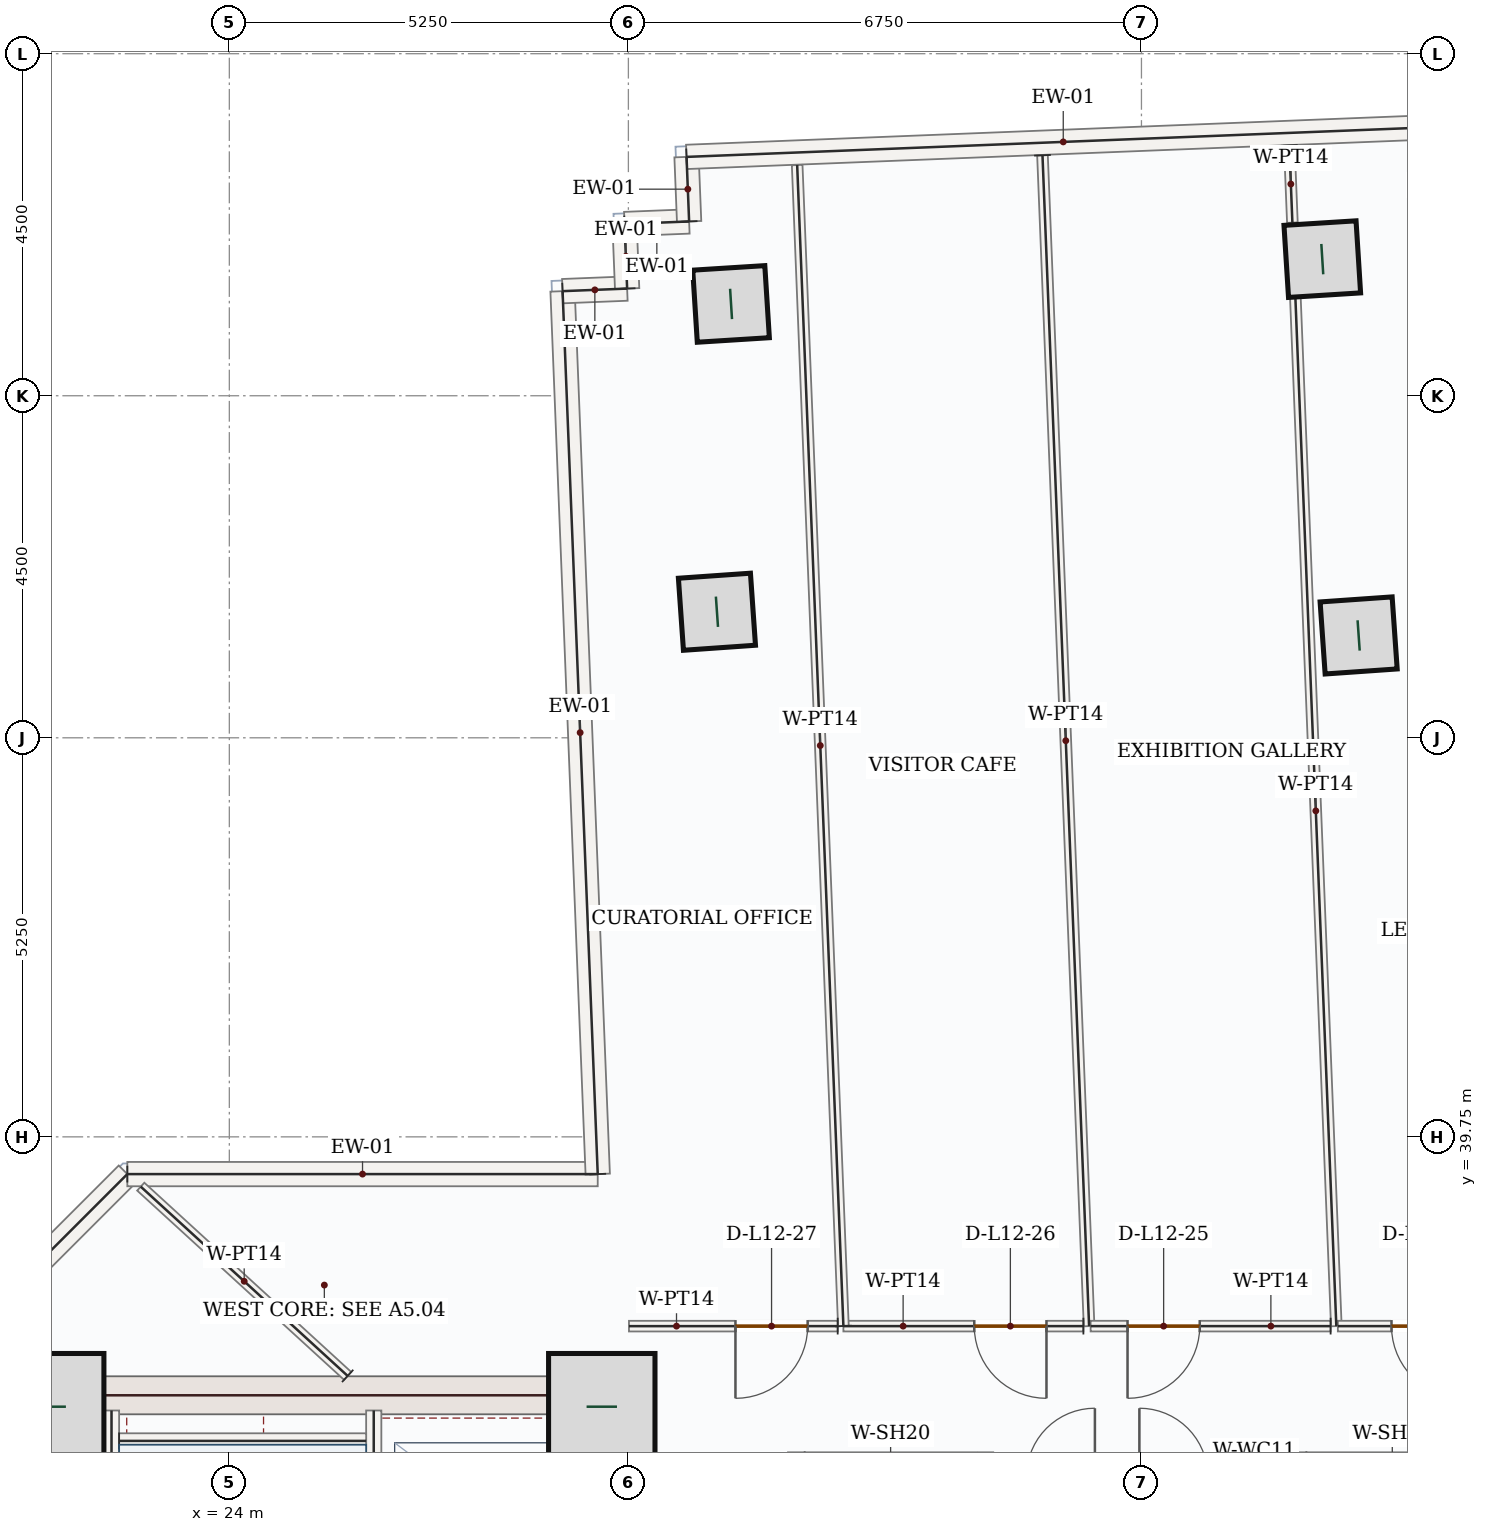
"""IFC4 building model, lengths in metres.
Left out: names, types, materials, properties, quantities, classifications, styles, units other than length and angle.
Written with IfcOpenShell. Run it as: python <this file> out.ifc"""

import sys

from ifc_helpers import new_model, si_unit, direction, frame, frame_2d, origin, origin_2d, place, context, subcontext, project, spatial, rectangle, hollow_rectangle, extrude, source, transform, mapped, element, fill, save


model = new_model("IFC4")
c1 = context("Model", 3, precision=1e-05, world=origin(), true_north=direction((0.0, 1.0)))
c2 = subcontext(c1, "Body", "Model", "MODEL_VIEW")
j1 = project(units=[si_unit("LENGTHUNIT", "METRE"), si_unit("PLANEANGLEUNIT", "RADIAN")], contexts=[c1])
p1 = place(None, origin())
s1 = spatial("IfcSite", under=j1, at=p1, CompositionType="ELEMENT")
p2 = place(p1, origin())
s2 = spatial("IfcBuilding", under=s1, at=p2, CompositionType="ELEMENT")
p3 = place(p2, frame((0.0, 0.0, 58.5)))
s3 = spatial("IfcBuildingStorey", under=s2, at=p3, CompositionType="ELEMENT", Elevation=58.5)
m1 = source(origin(), c2, "Body", "SweptSolid", [
    extrude(rectangle(XDim=8.55, YDim=0.5, at=frame_2d((4.275, 0.0))), origin(), (0.0, 0.0, 1.0), 3.95),
])
p4 = place(p3, frame((21.5, 28.05, 0.0), z_axis=(0.0, 0.0, 1.0), x_axis=(0.0, 1.0, 0.0)))
e1 = element("IfcWall", 1, at=p4, inside=s3, PredefinedType="SHEAR", context=c2, shape_type="MappedRepresentation", body=[
    mapped(m1, transform((0.0, 0.0, 0.0), x_axis=(1.0, 0.0, 0.0), y_axis=(0.0, 1.0, 0.0), z_axis=(0.0, 0.0, 1.0), scale=1.0)),
])
p5 = place(p3, frame((29.0, 28.05, 0.0), z_axis=(0.0, 0.0, 1.0), x_axis=(0.0, 1.0, 0.0)))
e2 = element("IfcWall", 2, at=p5, inside=s3, PredefinedType="SHEAR", context=c2, shape_type="SweptSolid", body=[
    extrude(rectangle(XDim=8.55, YDim=0.5, at=frame_2d((4.275, 0.0))), origin(), (0.0, 0.0, 1.0), 3.95),
])
p6 = place(p5, frame((1.5, 0.0, 0.0)))
e3 = element("IfcOpeningElement", 3, at=p6, cuts=e2, PredefinedType="OPENING", context=c2, shape_type="SweptSolid", body=[
    extrude(rectangle(XDim=1.1, YDim=2.2, at=frame_2d((0.55, 1.1))), frame((0.0, 0.26, 0.0), z_axis=(0.0, -1.0, 0.0), x_axis=(1.0, 0.0, 0.0)), (0.0, 0.0, 1.0), 0.52),
])
m2 = source(origin(), c2, "Body", "SweptSolid", [
    extrude(rectangle(XDim=7.0, YDim=0.5, at=frame_2d((3.5, 0.0))), origin(), (0.0, 0.0, 1.0), 3.95),
])
p7 = place(p3, frame((21.75, 36.35, 0.0), z_axis=(0.0, 0.0, 1.0), x_axis=(1.0, 0.0, 0.0)))
e4 = element("IfcWall", 4, at=p7, inside=s3, PredefinedType="SHEAR", context=c2, shape_type="MappedRepresentation", body=[
    mapped(m2, transform((0.0, 0.0, 0.0), x_axis=(1.0, 0.0, 0.0), y_axis=(0.0, 1.0, 0.0), z_axis=(0.0, 0.0, 1.0), scale=1.0)),
])
m3 = source(origin(), c2, "Body", "SweptSolid", [
    extrude(rectangle(XDim=1.4, YDim=1.4, at=origin_2d()), origin(), (0.0, 0.0, 1.0), 4.2),
])
for number, where, z_axis, x_axis in (
    (5, (21.65, 36.2, 0.0), (0.0, 0.0, 1.0), (1.0, 0.0, 0.0)),
    (6, (28.9, 36.2, 0.0), (0.0, 0.0, 1.0), (1.0, 0.0, 0.0)),
):
    element("IfcColumn", number, at=place(p3, frame(where, z_axis=z_axis, x_axis=x_axis)), inside=s3, PredefinedType="COLUMN", context=c2, shape_type="MappedRepresentation", body=[
        mapped(m3, transform((0.0, 0.0, 0.0), x_axis=(1.0, 0.0, 0.0), y_axis=(0.0, 1.0, 0.0), z_axis=(0.0, 0.0, 1.0), scale=1.0)),
    ])
m4 = source(origin(), c2, "Body", "SweptSolid", [
    extrude(hollow_rectangle(XDim=0.95, YDim=0.95, WallThickness=0.05, at=origin_2d()), origin(), (0.0, 0.0, 1.0), 4.2),
])
for number, where, z_axis, x_axis in (
    (7, (38.857, 46.346, 0.0), (0.0, 0.0, 1.0), (-0.07, 0.998, 0.0)),
    (8, (30.415, 46.658, 0.0), (0.0, 0.0, 1.0), (-0.07, 0.998, 0.0)),
    (9, (38.379, 51.297, 0.0), (0.0, 0.0, 1.0), (-0.063, 0.998, 0.0)),
    (10, (30.601, 50.708, 0.0), (0.0, 0.0, 1.0), (-0.063, 0.998, 0.0)),
):
    element("IfcColumn", number, at=place(p3, frame(where, z_axis=z_axis, x_axis=x_axis)), inside=s3, PredefinedType="COLUMN", context=c2, shape_type="MappedRepresentation", body=[
        mapped(m4, transform((0.0, 0.0, 0.0), x_axis=(1.0, 0.0, 0.0), y_axis=(0.0, 1.0, 0.0), z_axis=(0.0, 0.0, 1.0), scale=1.0)),
    ])
m5 = source(origin(), c2, "Body", "SweptSolid", [
    extrude(rectangle(XDim=5.258, YDim=0.32, at=frame_2d((2.629, 0.0))), origin(), (0.0, 0.0, 1.0), 3.95),
])
p8 = place(p3, frame((18.94, 35.542, 0.0), z_axis=(0.0, 0.0, 1.0), x_axis=(0.707106781187, 0.707106781187, 0.0)))
e11 = element("IfcWall", 11, at=p8, inside=s3, PredefinedType="SOLIDWALL", context=c2, shape_type="MappedRepresentation", body=[
    mapped(m5, transform((0.0, 0.0, 0.0), x_axis=(1.0, 0.0, 0.0), y_axis=(0.0, 1.0, 0.0), z_axis=(0.0, 0.0, 1.0), scale=1.0)),
])
m6 = source(origin(), c2, "Body", "SweptSolid", [
    extrude(rectangle(XDim=6.189, YDim=0.32, at=frame_2d((3.094, 0.0))), origin(), (0.0, 0.0, 1.0), 3.95),
])
p9 = place(p3, frame((22.658, 39.26, 0.0), z_axis=(0.0, 0.0, 1.0), x_axis=(1.0, 0.0, 0.0)))
e12 = element("IfcWall", 12, at=p9, inside=s3, PredefinedType="SOLIDWALL", context=c2, shape_type="MappedRepresentation", body=[
    mapped(m6, transform((0.0, 0.0, 0.0), x_axis=(1.0, 0.0, 0.0), y_axis=(0.0, 1.0, 0.0), z_axis=(0.0, 0.0, 1.0), scale=1.0)),
])
m7 = source(origin(), c2, "Body", "SweptSolid", [
    extrude(rectangle(XDim=11.625, YDim=0.32, at=frame_2d((5.812, 0.0))), origin(), (0.0, 0.0, 1.0), 3.95),
])
p10 = place(p3, frame((28.847, 39.26, 0.0), z_axis=(0.0, 0.0, 1.0), x_axis=(-0.039775975357, 0.999208622753, 0.0)))
e13 = element("IfcWall", 13, at=p10, inside=s3, PredefinedType="SOLIDWALL", context=c2, shape_type="MappedRepresentation", body=[
    mapped(m7, transform((0.0, 0.0, 0.0), x_axis=(1.0, 0.0, 0.0), y_axis=(0.0, 1.0, 0.0), z_axis=(0.0, 0.0, 1.0), scale=1.0)),
])
m8 = source(origin(), c2, "Body", "SweptSolid", [
    extrude(rectangle(XDim=0.85, YDim=0.32, at=frame_2d((0.425, 0.0))), origin(), (0.0, 0.0, 1.0), 3.95),
])
for number, where, z_axis, x_axis in (
    (14, (28.384, 50.876, 0.0), (0.0, 0.0, 1.0), (0.999, 0.04, 0.0)),
    (15, (29.233, 50.91, 0.0), (0.0, 0.0, 1.0), (-0.04, 0.999, 0.0)),
):
    element("IfcWall", number, at=place(p3, frame(where, z_axis=z_axis, x_axis=x_axis)), inside=s3, PredefinedType="SOLIDWALL", context=c2, shape_type="MappedRepresentation", body=[
        mapped(m8, transform((0.0, 0.0, 0.0), x_axis=(1.0, 0.0, 0.0), y_axis=(0.0, 1.0, 0.0), z_axis=(0.0, 0.0, 1.0), scale=1.0)),
    ])
m9 = source(origin(), c2, "Body", "SweptSolid", [
    extrude(rectangle(XDim=0.85, YDim=0.32, at=frame_2d((0.425, 0.0))), origin(), (0.0, 0.0, 1.0), 3.95),
])
p11 = place(p3, frame((29.2, 51.759, 0.0), z_axis=(0.0, 0.0, 1.0), x_axis=(0.999202792875, 0.039922158152, 0.0)))
e16 = element("IfcWall", 16, at=p11, inside=s3, PredefinedType="SOLIDWALL", context=c2, shape_type="MappedRepresentation", body=[
    mapped(m9, transform((0.0, 0.0, 0.0), x_axis=(1.0, 0.0, 0.0), y_axis=(0.0, 1.0, 0.0), z_axis=(0.0, 0.0, 1.0), scale=1.0)),
])
p12 = place(p3, frame((30.049, 51.793, 0.0), z_axis=(0.0, 0.0, 1.0), x_axis=(-0.039933618331, 0.999202334929, 0.0)))
e17 = element("IfcWall", 17, at=p12, inside=s3, PredefinedType="SOLIDWALL", context=c2, shape_type="MappedRepresentation", body=[
    mapped(m8, transform((0.0, 0.0, 0.0), x_axis=(1.0, 0.0, 0.0), y_axis=(0.0, 1.0, 0.0), z_axis=(0.0, 0.0, 1.0), scale=1.0)),
])
m10 = source(origin(), c2, "Body", "SweptSolid", [
    extrude(rectangle(XDim=9.92, YDim=0.32, at=frame_2d((4.96, 0.0))), origin(), (0.0, 0.0, 1.0), 3.95),
])
p13 = place(p3, frame((30.015, 52.642, 0.0), z_axis=(0.0, 0.0, 1.0), x_axis=(0.999207823998, 0.039796035749, 0.0)))
e18 = element("IfcWall", 18, at=p13, inside=s3, PredefinedType="SOLIDWALL", context=c2, shape_type="MappedRepresentation", body=[
    mapped(m10, transform((0.0, 0.0, 0.0), x_axis=(1.0, 0.0, 0.0), y_axis=(0.0, 1.0, 0.0), z_axis=(0.0, 0.0, 1.0), scale=1.0)),
])
m11 = source(origin(), c2, "Body", "SweptSolid", [
    extrude(rectangle(XDim=7.87, YDim=0.2, at=frame_2d((3.935, 0.0))), origin(), (0.0, 0.0, 1.0), 3.95),
])
p14 = place(p3, frame((22.45, 28.28, 0.0), z_axis=(0.0, 0.0, 1.0), x_axis=(0.0, 1.0, 0.0)))
e19 = element("IfcWall", 19, at=p14, inside=s3, PredefinedType="SOLIDWALL", context=c2, shape_type="MappedRepresentation", body=[
    mapped(m11, transform((0.0, 0.0, 0.0), x_axis=(1.0, 0.0, 0.0), y_axis=(0.0, 1.0, 0.0), z_axis=(0.0, 0.0, 1.0), scale=1.0)),
])
p15 = place(p3, frame((25.9, 28.15, 0.0), z_axis=(0.0, 0.0, 1.0), x_axis=(0.0, 1.0, 0.0)))
e20 = element("IfcWall", 20, at=p15, inside=s3, PredefinedType="SOLIDWALL", context=c2, shape_type="SweptSolid", body=[
    extrude(rectangle(XDim=8.0, YDim=0.2, at=frame_2d((4.0, 0.0))), origin(), (0.0, 0.0, 1.0), 3.95),
])
p16 = place(p15, frame((0.4, 0.0, 0.0)))
e21 = element("IfcOpeningElement", 21, at=p16, cuts=e20, PredefinedType="OPENING", context=c2, shape_type="SweptSolid", body=[
    extrude(rectangle(XDim=1.05, YDim=2.15, at=frame_2d((0.525, 1.075))), frame((0.0, 0.11, 0.0), z_axis=(0.0, -1.0, 0.0), x_axis=(1.0, 0.0, 0.0)), (0.0, 0.0, 1.0), 0.22),
])
m12 = source(origin(), c2, "Body", "SweptSolid", [
    extrude(rectangle(XDim=3.25, YDim=0.2, at=frame_2d((1.625, 0.0))), origin(), (0.0, 0.0, 1.0), 3.95),
])
p17 = place(p3, frame((22.55, 35.75, 0.0), z_axis=(0.0, 0.0, 1.0), x_axis=(1.0, 0.0, 0.0)))
e22 = element("IfcWall", 22, at=p17, inside=s3, PredefinedType="SOLIDWALL", context=c2, shape_type="MappedRepresentation", body=[
    mapped(m12, transform((0.0, 0.0, 0.0), x_axis=(1.0, 0.0, 0.0), y_axis=(0.0, 1.0, 0.0), z_axis=(0.0, 0.0, 1.0), scale=1.0)),
])
m13 = source(origin(), c2, "Body", "SweptSolid", [
    extrude(rectangle(XDim=2.4, YDim=0.2, at=frame_2d((1.2, 0.0))), origin(), (0.0, 0.0, 1.0), 3.95),
])
for number, where, z_axis, x_axis in (
    (23, (31.45, 33.2, 0.0), (0.0, 0.0, 1.0), (0.0, 1.0, 0.0)),
    (24, (33.95, 33.2, 0.0), (0.0, 0.0, 1.0), (0.0, 1.0, 0.0)),
    (25, (38.05, 33.2, 0.0), (0.0, 0.0, 1.0), (0.0, 1.0, 0.0)),
):
    element("IfcWall", number, at=place(p3, frame(where, z_axis=z_axis, x_axis=x_axis)), inside=s3, PredefinedType="SOLIDWALL", context=c2, shape_type="MappedRepresentation", body=[
        mapped(m13, transform((0.0, 0.0, 0.0), x_axis=(1.0, 0.0, 0.0), y_axis=(0.0, 1.0, 0.0), z_axis=(0.0, 0.0, 1.0), scale=1.0)),
    ])
m14 = source(origin(), c2, "Body", "SweptSolid", [
    extrude(rectangle(XDim=15.416, YDim=0.14, at=frame_2d((7.708, 0.0))), origin(), (0.0, 0.0, 1.0), 3.95),
])
p18 = place(p3, frame((34.698, 52.664, 0.0), z_axis=(0.0, 0.0, 1.0), x_axis=(0.039782723686, -0.999208354096, 0.0)))
e26 = element("IfcWall", 26, at=p18, inside=s3, PredefinedType="PARTITIONING", context=c2, shape_type="MappedRepresentation", body=[
    mapped(m14, transform((0.0, 0.0, 0.0), x_axis=(1.0, 0.0, 0.0), y_axis=(0.0, 1.0, 0.0), z_axis=(0.0, 0.0, 1.0), scale=1.0)),
])
p19 = place(p3, frame((35.236, 37.26, 0.0), z_axis=(0.0, 0.0, 1.0), x_axis=(-1.0, 0.0, 0.0)))
e27 = element("IfcWall", 27, at=p19, inside=s3, PredefinedType="PARTITIONING", context=c2, shape_type="SweptSolid", body=[
    extrude(rectangle(XDim=3.157, YDim=0.14, at=frame_2d((1.579, 0.0))), origin(), (0.0, 0.0, 1.0), 3.95),
])
p20 = place(p19, frame((0.486, 0.0, 0.0)))
e28 = element("IfcOpeningElement", 28, at=p20, cuts=e27, PredefinedType="OPENING", context=c2, shape_type="SweptSolid", body=[
    extrude(rectangle(XDim=0.95, YDim=2.15, at=frame_2d((0.475, 1.075))), frame((0.0, 0.08, 0.0), z_axis=(0.0, -1.0, 0.0), x_axis=(1.0, 0.0, 0.0)), (0.0, 0.0, 1.0), 0.16),
])
m15 = source(origin(), c2, "Body", "SweptSolid", [
    extrude(rectangle(XDim=15.286, YDim=0.14, at=frame_2d((7.643, 0.0))), origin(), (0.0, 0.0, 1.0), 3.95),
])
p21 = place(p3, frame((32.079, 37.261, 0.0), z_axis=(0.0, 0.0, 1.0), x_axis=(-0.039769031662, 0.99920889914, 0.0)))
e29 = element("IfcWall", 29, at=p21, inside=s3, PredefinedType="PARTITIONING", context=c2, shape_type="MappedRepresentation", body=[
    mapped(m15, transform((0.0, 0.0, 0.0), x_axis=(1.0, 0.0, 0.0), y_axis=(0.0, 1.0, 0.0), z_axis=(0.0, 0.0, 1.0), scale=1.0)),
])
m16 = source(origin(), c2, "Body", "SweptSolid", [
    extrude(rectangle(XDim=1.016, YDim=0.14, at=frame_2d((0.508, 0.0))), origin(), (0.0, 0.0, 1.0), 3.95),
])
p22 = place(p3, frame((37.945, 52.793, 0.0), z_axis=(0.0, 0.0, 1.0), x_axis=(0.03988168596, -0.99920440908, 0.0)))
e30 = element("IfcWall", 30, at=p22, inside=s3, PredefinedType="PARTITIONING", context=c2, shape_type="MappedRepresentation", body=[
    mapped(m16, transform((0.0, 0.0, 0.0), x_axis=(1.0, 0.0, 0.0), y_axis=(0.0, 1.0, 0.0), z_axis=(0.0, 0.0, 1.0), scale=1.0)),
])
m17 = source(origin(), c2, "Body", "SweptSolid", [
    extrude(rectangle(XDim=13.568, YDim=0.14, at=frame_2d((6.784, 0.0))), origin(), (0.0, 0.0, 1.0), 3.95),
])
p23 = place(p3, frame((38.024, 50.817, 0.0), z_axis=(0.0, 0.0, 1.0), x_axis=(0.039766111253, -0.99920901537, 0.0)))
e31 = element("IfcWall", 31, at=p23, inside=s3, PredefinedType="PARTITIONING", context=c2, shape_type="MappedRepresentation", body=[
    mapped(m17, transform((0.0, 0.0, 0.0), x_axis=(1.0, 0.0, 0.0), y_axis=(0.0, 1.0, 0.0), z_axis=(0.0, 0.0, 1.0), scale=1.0)),
])
p24 = place(p3, frame((38.489, 37.26, 0.0), z_axis=(0.0, 0.0, 1.0), x_axis=(-1.0, 0.0, 0.0)))
e32 = element("IfcWall", 32, at=p24, inside=s3, PredefinedType="PARTITIONING", context=c2, shape_type="SweptSolid", body=[
    extrude(rectangle(XDim=3.157, YDim=0.14, at=frame_2d((1.579, 0.0))), origin(), (0.0, 0.0, 1.0), 3.95),
])
p25 = place(p24, frame((1.722, 0.0, 0.0)))
e33 = element("IfcOpeningElement", 33, at=p25, cuts=e32, PredefinedType="OPENING", context=c2, shape_type="SweptSolid", body=[
    extrude(rectangle(XDim=0.95, YDim=2.15, at=frame_2d((0.475, 1.075))), frame((0.0, 0.08, 0.0), z_axis=(0.0, -1.0, 0.0), x_axis=(1.0, 0.0, 0.0)), (0.0, 0.0, 1.0), 0.16),
])
p26 = place(p3, frame((32.004, 37.26, 0.0), z_axis=(0.0, 0.0, 1.0), x_axis=(-0.999999996048, -8.8904694e-05, 0.0)))
e34 = element("IfcWall", 34, at=p26, inside=s3, PredefinedType="PARTITIONING", context=c2, shape_type="SweptSolid", body=[
    extrude(rectangle(XDim=2.746, YDim=0.14, at=frame_2d((1.373, 0.0))), origin(), (0.0, 0.0, 1.0), 3.95),
])
p27 = place(p26, frame((0.395, 0.0, 0.0)))
e35 = element("IfcOpeningElement", 35, at=p27, cuts=e34, PredefinedType="OPENING", context=c2, shape_type="SweptSolid", body=[
    extrude(rectangle(XDim=0.95, YDim=2.15, at=frame_2d((0.475, 1.075))), frame((0.0, 0.08, 0.0), z_axis=(0.0, -1.0, 0.0), x_axis=(1.0, 0.0, 0.0)), (0.0, 0.0, 1.0), 0.16),
])
m18 = source(origin(), c2, "Body", "SweptSolid", [
    extrude(rectangle(XDim=3.689, YDim=0.14, at=frame_2d((1.844, 0.0))), origin(), (0.0, 0.0, 1.0), 3.95),
])
p28 = place(p3, frame((25.557, 36.605, 0.0), z_axis=(0.0, 0.0, 1.0), x_axis=(-0.737843279395, 0.674972069831, 0.0)))
e36 = element("IfcWall", 36, at=p28, inside=s3, PredefinedType="PARTITIONING", context=c2, shape_type="MappedRepresentation", body=[
    mapped(m18, transform((0.0, 0.0, 0.0), x_axis=(1.0, 0.0, 0.0), y_axis=(0.0, 1.0, 0.0), z_axis=(0.0, 0.0, 1.0), scale=1.0)),
])
p29 = place(p3, frame((42.742, 37.26, 0.0), z_axis=(0.0, 0.0, 1.0), x_axis=(-0.999999998277, 5.8706117e-05, 0.0)))
e37 = element("IfcWall", 37, at=p29, inside=s3, PredefinedType="PARTITIONING", context=c2, shape_type="SweptSolid", body=[
    extrude(rectangle(XDim=4.159, YDim=0.14, at=frame_2d((2.079, 0.0))), origin(), (0.0, 0.0, 1.0), 3.95),
])
p30 = place(p29, frame((2.503, 0.0, 0.0)))
e38 = element("IfcOpeningElement", 38, at=p30, cuts=e37, PredefinedType="OPENING", context=c2, shape_type="SweptSolid", body=[
    extrude(rectangle(XDim=0.95, YDim=2.15, at=frame_2d((0.475, 1.075))), frame((0.0, 0.08, 0.0), z_axis=(0.0, -1.0, 0.0), x_axis=(1.0, 0.0, 0.0)), (0.0, 0.0, 1.0), 0.16),
])
m19 = source(origin(), c2, "Body", "SweptSolid", [
    extrude(rectangle(XDim=0.95, YDim=2.15, at=frame_2d((0.475, 1.075))), frame((0.0, 0.025, 0.0), z_axis=(0.0, -1.0, 0.0), x_axis=(1.0, 0.0, 0.0)), (0.0, 0.0, 1.0), 0.05),
])
p31 = place(p30, origin())
e39 = element("IfcDoor", 39, at=p31, inside=s3, OperationType="SINGLE_SWING_LEFT", PredefinedType="DOOR", context=c2, shape_type="MappedRepresentation", body=[
    mapped(m19, transform((0.0, 0.0, 0.0), x_axis=(1.0, 0.0, 0.0), y_axis=(0.0, 1.0, 0.0), z_axis=(0.0, 0.0, 1.0), scale=1.0)),
])
fill(e38, e39)
p32 = place(p25, origin())
e40 = element("IfcDoor", 40, at=p32, inside=s3, OperationType="SINGLE_SWING_RIGHT", PredefinedType="DOOR", context=c2, shape_type="MappedRepresentation", body=[
    mapped(m19, transform((0.0, 0.0, 0.0), x_axis=(1.0, 0.0, 0.0), y_axis=(0.0, 1.0, 0.0), z_axis=(0.0, 0.0, 1.0), scale=1.0)),
])
fill(e33, e40)
p33 = place(p20, origin())
e41 = element("IfcDoor", 41, at=p33, inside=s3, OperationType="SINGLE_SWING_LEFT", PredefinedType="DOOR", context=c2, shape_type="MappedRepresentation", body=[
    mapped(m19, transform((0.0, 0.0, 0.0), x_axis=(1.0, 0.0, 0.0), y_axis=(0.0, 1.0, 0.0), z_axis=(0.0, 0.0, 1.0), scale=1.0)),
])
fill(e28, e41)
p34 = place(p27, origin())
e42 = element("IfcDoor", 42, at=p34, inside=s3, OperationType="SINGLE_SWING_RIGHT", PredefinedType="DOOR", context=c2, shape_type="MappedRepresentation", body=[
    mapped(m19, transform((0.0, 0.0, 0.0), x_axis=(1.0, 0.0, 0.0), y_axis=(0.0, 1.0, 0.0), z_axis=(0.0, 0.0, 1.0), scale=1.0)),
])
fill(e35, e42)
save(model, sys.argv[1])
